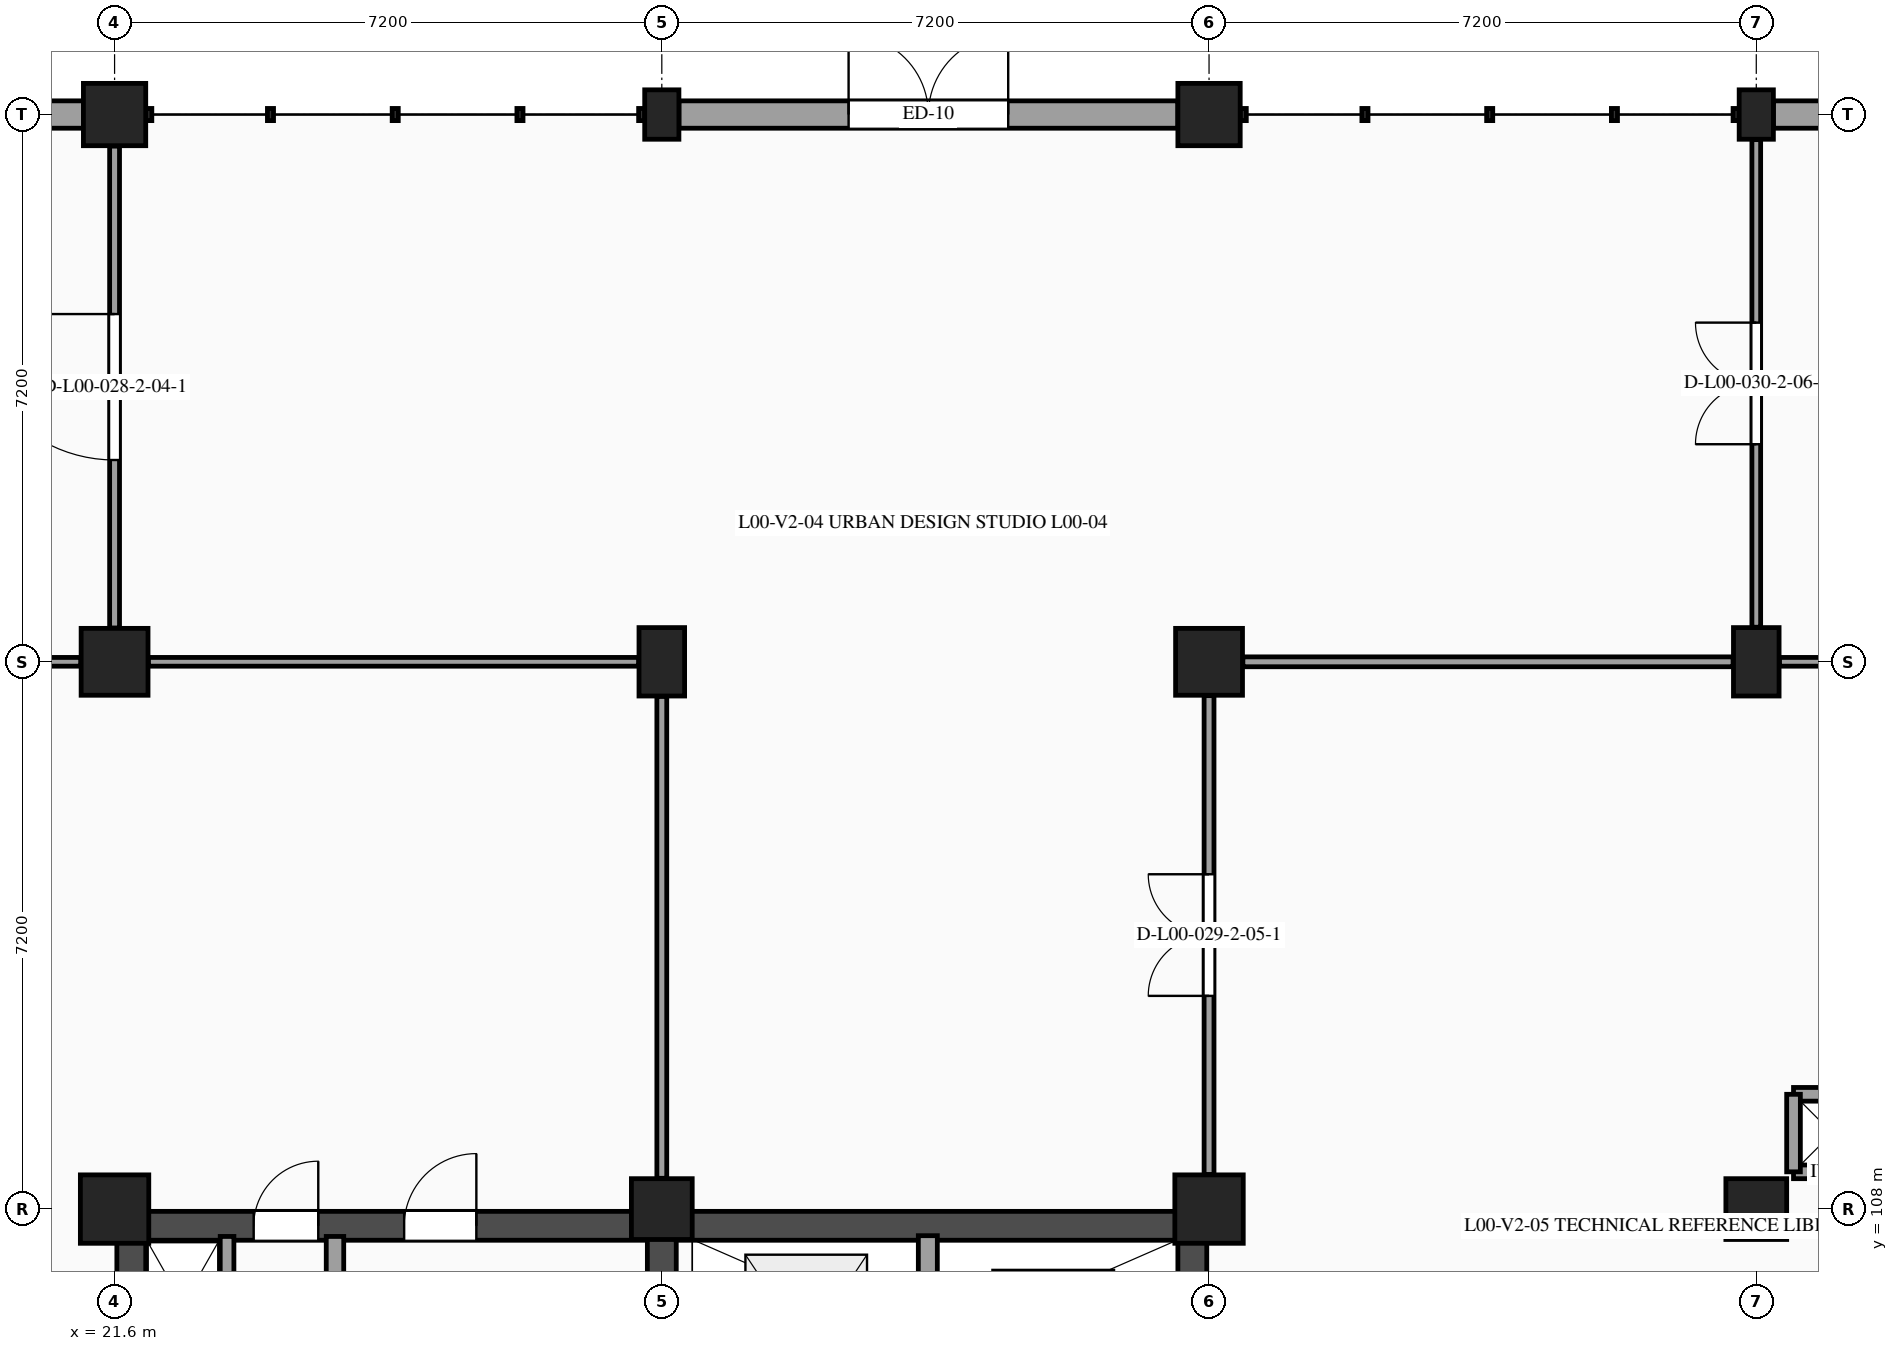
"""IFC4 building model, lengths in metres.
Left out: names, types, materials, properties, quantities, classifications, styles, units other than length and angle.
Written with IfcOpenShell. Run it as: python <this file> out.ifc"""

import sys

from ifc_helpers import new_model, si_unit, direction, frame, frame_2d, origin, origin_2d, place, context, subcontext, project, spatial, rectangle, extrude, element, fill, save


model = new_model("IFC4")
c1 = context("Model", 3, precision=1e-05, world=origin(), true_north=direction((0.0, 1.0)))
c2 = subcontext(c1, "Body", "Model", "MODEL_VIEW")
j1 = project(units=[si_unit("LENGTHUNIT", "METRE"), si_unit("PLANEANGLEUNIT", "RADIAN")], contexts=[c1])
p1 = place(None, origin())
s1 = spatial("IfcSite", under=j1, at=p1, CompositionType="ELEMENT")
p2 = place(p1, origin())
s2 = spatial("IfcBuilding", under=s1, at=p2, CompositionType="ELEMENT")
p3 = place(p2, origin())
s3 = spatial("IfcBuildingStorey", under=s2, at=p3, CompositionType="ELEMENT", Elevation=0.0)
p4 = place(p3, frame((21.6, 108.0, 0.0), z_axis=(0.0, 0.0, 1.0), x_axis=(1.0, 0.0, 0.0)))
e1 = element("IfcColumn", 1, at=p4, inside=s3, PredefinedType="COLUMN", context=c2, shape_type="SweptSolid", body=[
    extrude(rectangle(XDim=0.9, YDim=0.9, at=origin_2d()), origin(), (0.0, 0.0, 1.0), 5.4),
])
p5 = place(p3, frame((21.6, 115.2, 0.0), z_axis=(0.0, 0.0, 1.0), x_axis=(1.0, 0.0, 0.0)))
e2 = element("IfcColumn", 2, at=p5, inside=s3, PredefinedType="COLUMN", context=c2, shape_type="SweptSolid", body=[
    extrude(rectangle(XDim=0.88, YDim=0.88, at=origin_2d()), origin(), (0.0, 0.0, 1.0), 5.4),
])
p6 = place(p3, frame((21.6, 122.4, 0.0), z_axis=(0.0, 0.0, 1.0), x_axis=(1.0, 0.0, 0.0)))
e3 = element("IfcColumn", 3, at=p6, inside=s3, PredefinedType="COLUMN", context=c2, shape_type="SweptSolid", body=[
    extrude(rectangle(XDim=0.82, YDim=0.82, at=origin_2d()), origin(), (0.0, 0.0, 1.0), 5.4),
])
p7 = place(p3, frame((28.8, 108.0, 0.0), z_axis=(0.0, 0.0, 1.0), x_axis=(1.0, 0.0, 0.0)))
e4 = element("IfcColumn", 4, at=p7, inside=s3, PredefinedType="COLUMN", context=c2, shape_type="SweptSolid", body=[
    extrude(rectangle(XDim=0.8, YDim=0.8, at=origin_2d()), origin(), (0.0, 0.0, 1.0), 5.4),
])
p8 = place(p3, frame((28.8, 115.2, 0.0), z_axis=(0.0, 0.0, 1.0), x_axis=(1.0, 0.0, 0.0)))
e5 = element("IfcColumn", 5, at=p8, inside=s3, PredefinedType="COLUMN", context=c2, shape_type="SweptSolid", body=[
    extrude(rectangle(XDim=0.6, YDim=0.9, at=origin_2d()), origin(), (0.0, 0.0, 1.0), 5.4),
])
p9 = place(p3, frame((28.8, 122.4, 0.0), z_axis=(0.0, 0.0, 1.0), x_axis=(1.0, 0.0, 0.0)))
e6 = element("IfcColumn", 6, at=p9, inside=s3, PredefinedType="PILASTER", context=c2, shape_type="SweptSolid", body=[
    extrude(rectangle(XDim=0.45, YDim=0.65, at=origin_2d()), origin(), (0.0, 0.0, 1.0), 5.4),
])
p10 = place(p3, frame((36.0, 108.0, 0.0), z_axis=(0.0, 0.0, 1.0), x_axis=(1.0, 0.0, 0.0)))
e7 = element("IfcColumn", 7, at=p10, inside=s3, PredefinedType="COLUMN", context=c2, shape_type="SweptSolid", body=[
    extrude(rectangle(XDim=0.9, YDim=0.9, at=origin_2d()), origin(), (0.0, 0.0, 1.0), 5.4),
])
p11 = place(p3, frame((36.0, 115.2, 0.0), z_axis=(0.0, 0.0, 1.0), x_axis=(1.0, 0.0, 0.0)))
e8 = element("IfcColumn", 8, at=p11, inside=s3, PredefinedType="COLUMN", context=c2, shape_type="SweptSolid", body=[
    extrude(rectangle(XDim=0.88, YDim=0.88, at=origin_2d()), origin(), (0.0, 0.0, 1.0), 5.4),
])
p12 = place(p3, frame((36.0, 122.4, 0.0), z_axis=(0.0, 0.0, 1.0), x_axis=(1.0, 0.0, 0.0)))
e9 = element("IfcColumn", 9, at=p12, inside=s3, PredefinedType="COLUMN", context=c2, shape_type="SweptSolid", body=[
    extrude(rectangle(XDim=0.82, YDim=0.82, at=origin_2d()), origin(), (0.0, 0.0, 1.0), 5.4),
])
p13 = place(p3, frame((43.2, 108.0, 0.0), z_axis=(0.0, 0.0, 1.0), x_axis=(1.0, 0.0, 0.0)))
e10 = element("IfcColumn", 10, at=p13, inside=s3, PredefinedType="COLUMN", context=c2, shape_type="SweptSolid", body=[
    extrude(rectangle(XDim=0.8, YDim=0.8, at=origin_2d()), origin(), (0.0, 0.0, 1.0), 5.4),
])
p14 = place(p3, frame((43.2, 115.2, 0.0), z_axis=(0.0, 0.0, 1.0), x_axis=(1.0, 0.0, 0.0)))
e11 = element("IfcColumn", 11, at=p14, inside=s3, PredefinedType="COLUMN", context=c2, shape_type="SweptSolid", body=[
    extrude(rectangle(XDim=0.6, YDim=0.9, at=origin_2d()), origin(), (0.0, 0.0, 1.0), 5.4),
])
p15 = place(p3, frame((43.2, 122.4, 0.0), z_axis=(0.0, 0.0, 1.0), x_axis=(1.0, 0.0, 0.0)))
e12 = element("IfcColumn", 12, at=p15, inside=s3, PredefinedType="PILASTER", context=c2, shape_type="SweptSolid", body=[
    extrude(rectangle(XDim=0.45, YDim=0.65, at=origin_2d()), origin(), (0.0, 0.0, 1.0), 5.4),
])
p16 = place(p3, frame((14.625, 122.4, 0.0), z_axis=(0.0, 0.0, 1.0), x_axis=(1.0, 0.0, 0.0)))
e13 = element("IfcWall", 13, at=p16, inside=s3, PredefinedType="STANDARD", context=c2, shape_type="SweptSolid", body=[
    extrude(rectangle(XDim=6.565, YDim=0.36, at=frame_2d((3.282, 0.0))), origin(), (0.0, 0.0, 1.0), 4.37),
])
p17 = place(p16, frame((2.232, 0.0, 0.0)))
e14 = element("IfcOpeningElement", 14, at=p17, cuts=e13, PredefinedType="OPENING", context=c2, shape_type="SweptSolid", body=[
    extrude(rectangle(XDim=2.1, YDim=2.4, at=frame_2d((1.05, 1.2))), frame((0.0, 0.19, 0.0), z_axis=(0.0, -1.0, 0.0), x_axis=(1.0, 0.0, 0.0)), (0.0, 0.0, 1.0), 0.38),
])
p18 = place(p3, frame((29.025, 122.4, 0.0), z_axis=(0.0, 0.0, 1.0), x_axis=(1.0, 0.0, 0.0)))
e15 = element("IfcWall", 15, at=p18, inside=s3, PredefinedType="STANDARD", context=c2, shape_type="SweptSolid", body=[
    extrude(rectangle(XDim=6.565, YDim=0.36, at=frame_2d((3.283, 0.0))), origin(), (0.0, 0.0, 1.0), 4.37),
])
p19 = place(p18, frame((2.232, 0.0, 0.0)))
e16 = element("IfcOpeningElement", 16, at=p19, cuts=e15, PredefinedType="OPENING", context=c2, shape_type="SweptSolid", body=[
    extrude(rectangle(XDim=2.1, YDim=2.4, at=frame_2d((1.05, 1.2))), frame((0.0, 0.19, 0.0), z_axis=(0.0, -1.0, 0.0), x_axis=(1.0, 0.0, 0.0)), (0.0, 0.0, 1.0), 0.38),
])
p20 = place(p3, frame((43.425, 122.4, 0.0), z_axis=(0.0, 0.0, 1.0), x_axis=(1.0, 0.0, 0.0)))
e17 = element("IfcWall", 17, at=p20, inside=s3, PredefinedType="STANDARD", context=c2, shape_type="SweptSolid", body=[
    extrude(rectangle(XDim=6.565, YDim=0.36, at=frame_2d((3.282, 0.0))), origin(), (0.0, 0.0, 1.0), 4.37),
])
p21 = place(p20, frame((2.232, 0.0, 0.0)))
e18 = element("IfcOpeningElement", 18, at=p21, cuts=e17, PredefinedType="OPENING", context=c2, shape_type="SweptSolid", body=[
    extrude(rectangle(XDim=2.1, YDim=2.4, at=frame_2d((1.05, 1.2))), frame((0.0, 0.19, 0.0), z_axis=(0.0, -1.0, 0.0), x_axis=(1.0, 0.0, 0.0)), (0.0, 0.0, 1.0), 0.38),
])
p22 = place(p3, frame((21.82, 107.97, 0.0), z_axis=(0.0, 0.0, 1.0), x_axis=(0.0, -1.0, 0.0)))
e19 = element("IfcWall", 19, at=p22, inside=s3, PredefinedType="SHEAR", context=c2, shape_type="SweptSolid", body=[
    extrude(rectangle(XDim=7.14, YDim=0.38, at=frame_2d((3.57, 0.0))), origin(), (0.0, 0.0, 1.0), 5.09),
])
p23 = place(p3, frame((22.01, 107.78, 0.0), z_axis=(0.0, 0.0, 1.0), x_axis=(1.0, 0.0, 0.0)))
e20 = element("IfcWall", 20, at=p23, inside=s3, PredefinedType="SHEAR", context=c2, shape_type="SweptSolid", body=[
    extrude(rectangle(XDim=6.6, YDim=0.38, at=frame_2d((3.3, 0.0))), origin(), (0.0, 0.0, 1.0), 5.09),
])
p24 = place(p23, frame((1.42, 0.0, 0.0)))
e21 = element("IfcOpeningElement", 21, at=p24, cuts=e20, PredefinedType="OPENING", context=c2, shape_type="SweptSolid", body=[
    extrude(rectangle(XDim=0.85, YDim=2.1, at=frame_2d((0.425, 1.05))), frame((0.0, 0.2, 0.0), z_axis=(0.0, -1.0, 0.0), x_axis=(1.0, 0.0, 0.0)), (0.0, 0.0, 1.0), 0.4),
])
p25 = place(p23, frame((3.4, 0.0, 0.0)))
e22 = element("IfcOpeningElement", 22, at=p25, cuts=e20, PredefinedType="OPENING", context=c2, shape_type="SweptSolid", body=[
    extrude(rectangle(XDim=0.95, YDim=2.15, at=frame_2d((0.475, 1.075))), frame((0.0, 0.2, 0.0), z_axis=(0.0, -1.0, 0.0), x_axis=(1.0, 0.0, 0.0)), (0.0, 0.0, 1.0), 0.4),
])
p26 = place(p3, frame((24.5, 105.9, 0.0), z_axis=(0.0, 0.0, 1.0), x_axis=(0.0, 1.0, 0.0)))
e23 = element("IfcWall", 23, at=p26, inside=s3, PredefinedType="PARTITIONING", context=c2, shape_type="SweptSolid", body=[
    extrude(rectangle(XDim=1.74, YDim=0.23, at=frame_2d((0.87, 0.0))), origin(), (0.0, 0.0, 1.0), 5.09),
])
p27 = place(p3, frame((23.08, 105.88, 0.0), z_axis=(0.0, 0.0, 1.0), x_axis=(0.0, 1.0, 0.0)))
e24 = element("IfcWall", 24, at=p27, inside=s3, PredefinedType="PARTITIONING", context=c2, shape_type="SweptSolid", body=[
    extrude(rectangle(XDim=1.76, YDim=0.18, at=frame_2d((0.88, 0.0))), origin(), (0.0, 0.0, 1.0), 5.09),
])
p28 = place(p3, frame((28.8, 100.83, 0.0), z_axis=(0.0, 0.0, 1.0), x_axis=(0.0, 1.0, 0.0)))
e25 = element("IfcWall", 25, at=p28, inside=s3, PredefinedType="SHEAR", context=c2, shape_type="SweptSolid", body=[
    extrude(rectangle(XDim=7.14, YDim=0.38, at=frame_2d((3.57, 0.0))), origin(), (0.0, 0.0, 1.0), 5.09),
])
p29 = place(p28, frame((1.4, 0.0, 0.0)))
e26 = element("IfcOpeningElement", 26, at=p29, cuts=e25, PredefinedType="OPENING", context=c2, shape_type="SweptSolid", body=[
    extrude(rectangle(XDim=1.8, YDim=2.2, at=frame_2d((0.9, 1.1))), frame((0.0, 0.2, 0.0), z_axis=(0.0, -1.0, 0.0), x_axis=(1.0, 0.0, 0.0)), (0.0, 0.0, 1.0), 0.4),
])
p30 = place(p3, frame((35.78, 100.83, 0.0), z_axis=(0.0, 0.0, 1.0), x_axis=(0.0, 1.0, 0.0)))
e27 = element("IfcWall", 27, at=p30, inside=s3, PredefinedType="SHEAR", context=c2, shape_type="SweptSolid", body=[
    extrude(rectangle(XDim=7.14, YDim=0.38, at=frame_2d((3.57, 0.0))), origin(), (0.0, 0.0, 1.0), 5.09),
])
p31 = place(p3, frame((28.99, 107.78, 0.0), z_axis=(0.0, 0.0, 1.0), x_axis=(1.0, 0.0, 0.0)))
e28 = element("IfcWall", 28, at=p31, inside=s3, PredefinedType="SHEAR", context=c2, shape_type="SweptSolid", body=[
    extrude(rectangle(XDim=6.6, YDim=0.38, at=frame_2d((3.3, 0.0))), origin(), (0.0, 0.0, 1.0), 5.09),
])
p32 = place(p3, frame((32.3, 104.78, 0.0), z_axis=(0.0, 0.0, 1.0), x_axis=(0.0, 1.0, 0.0)))
e29 = element("IfcWall", 29, at=p32, inside=s3, PredefinedType="PARTITIONING", context=c2, shape_type="SweptSolid", body=[
    extrude(rectangle(XDim=2.87, YDim=0.25, at=frame_2d((1.435, 0.0))), origin(), (0.0, 0.0, 1.0), 5.09),
])
for number, where, z_axis, x_axis in (
    (30, (43.69, 108.49, 0.0), (0.0, 0.0, 1.0), (1.0, 0.0, 0.0)),
    (31, (44.71, 109.51, 0.0), (0.0, 0.0, 1.0), (-1.0, 0.0, 0.0)),
    (32, (43.69, 109.51, 0.0), (0.0, 0.0, 1.0), (0.0, -1.0, 0.0)),
):
    element("IfcWall", number, at=place(p3, frame(where, z_axis=z_axis, x_axis=x_axis)), inside=s3, PredefinedType="PARTITIONING", context=c2, shape_type="SweptSolid", body=[
        extrude(rectangle(XDim=1.02, YDim=0.18, at=frame_2d((0.51, 0.0))), origin(), (0.0, 0.0, 1.0), 5.09),
    ])
p33 = place(p3, frame((14.705, 115.2, 0.0), z_axis=(0.0, 0.0, 1.0), x_axis=(1.0, 0.0, 0.0)))
e33 = element("IfcWall", 33, at=p33, inside=s3, PredefinedType="PARTITIONING", context=c2, shape_type="SweptSolid", body=[
    extrude(rectangle(XDim=6.45, YDim=0.115, at=frame_2d((3.225, 0.0))), origin(), (0.0, 0.0, 1.0), 4.35),
])
p34 = place(p3, frame((21.6, 115.645, 0.0), z_axis=(0.0, 0.0, 1.0), x_axis=(0.0, 1.0, 0.0)))
e34 = element("IfcWall", 34, at=p34, inside=s3, PredefinedType="PARTITIONING", context=c2, shape_type="SweptSolid", body=[
    extrude(rectangle(XDim=6.34, YDim=0.13, at=frame_2d((3.17, 0.0))), origin(), (0.0, 0.0, 1.0), 4.405),
])
p35 = place(p34, frame((2.21, 0.0, 0.0)))
e35 = element("IfcOpeningElement", 35, at=p35, cuts=e34, PredefinedType="OPENING", context=c2, shape_type="SweptSolid", body=[
    extrude(rectangle(XDim=1.92, YDim=2.35, at=frame_2d((0.96, 1.175))), frame((0.0, 0.075, 0.0), z_axis=(0.0, -1.0, 0.0), x_axis=(1.0, 0.0, 0.0)), (0.0, 0.0, 1.0), 0.15),
])
p36 = place(p3, frame((28.8, 108.405, 0.0), z_axis=(0.0, 0.0, 1.0), x_axis=(0.0, 1.0, 0.0)))
e36 = element("IfcWall", 36, at=p36, inside=s3, PredefinedType="PARTITIONING", context=c2, shape_type="SweptSolid", body=[
    extrude(rectangle(XDim=6.34, YDim=0.13, at=frame_2d((3.17, 0.0))), origin(), (0.0, 0.0, 1.0), 4.405),
])
p37 = place(p3, frame((22.045, 115.2, 0.0), z_axis=(0.0, 0.0, 1.0), x_axis=(1.0, 0.0, 0.0)))
e37 = element("IfcWall", 37, at=p37, inside=s3, PredefinedType="PARTITIONING", context=c2, shape_type="SweptSolid", body=[
    extrude(rectangle(XDim=6.45, YDim=0.115, at=frame_2d((3.225, 0.0))), origin(), (0.0, 0.0, 1.0), 4.365),
])
p38 = place(p3, frame((36.0, 108.455, 0.0), z_axis=(0.0, 0.0, 1.0), x_axis=(0.0, 1.0, 0.0)))
e38 = element("IfcWall", 38, at=p38, inside=s3, PredefinedType="PARTITIONING", context=c2, shape_type="SweptSolid", body=[
    extrude(rectangle(XDim=6.3, YDim=0.13, at=frame_2d((3.15, 0.0))), origin(), (0.0, 0.0, 1.0), 4.405),
])
p39 = place(p38, frame((2.35, 0.0, 0.0)))
e39 = element("IfcOpeningElement", 39, at=p39, cuts=e38, PredefinedType="OPENING", context=c2, shape_type="SweptSolid", body=[
    extrude(rectangle(XDim=1.6, YDim=2.2, at=frame_2d((0.8, 1.1))), frame((0.0, 0.075, 0.0), z_axis=(0.0, -1.0, 0.0), x_axis=(1.0, 0.0, 0.0)), (0.0, 0.0, 1.0), 0.15),
])
p40 = place(p3, frame((36.445, 115.2, 0.0), z_axis=(0.0, 0.0, 1.0), x_axis=(1.0, 0.0, 0.0)))
e40 = element("IfcWall", 40, at=p40, inside=s3, PredefinedType="PARTITIONING", context=c2, shape_type="SweptSolid", body=[
    extrude(rectangle(XDim=6.45, YDim=0.13, at=frame_2d((3.225, 0.0))), origin(), (0.0, 0.0, 1.0), 4.39),
])
p41 = place(p3, frame((43.2, 115.655, 0.0), z_axis=(0.0, 0.0, 1.0), x_axis=(0.0, 1.0, 0.0)))
e41 = element("IfcWall", 41, at=p41, inside=s3, PredefinedType="PARTITIONING", context=c2, shape_type="SweptSolid", body=[
    extrude(rectangle(XDim=6.415, YDim=0.115, at=frame_2d((3.208, 0.0))), origin(), (0.0, 0.0, 1.0), 4.405),
])
p42 = place(p41, frame((2.407, 0.0, 0.0)))
e42 = element("IfcOpeningElement", 42, at=p42, cuts=e41, PredefinedType="OPENING", context=c2, shape_type="SweptSolid", body=[
    extrude(rectangle(XDim=1.6, YDim=2.2, at=frame_2d((0.8, 1.1))), frame((0.0, 0.067, 0.0), z_axis=(0.0, -1.0, 0.0), x_axis=(1.0, 0.0, 0.0)), (0.0, 0.0, 1.0), 0.135),
])
p43 = place(p3, frame((43.505, 115.2, 0.0), z_axis=(0.0, 0.0, 1.0), x_axis=(1.0, 0.0, 0.0)))
e43 = element("IfcWall", 43, at=p43, inside=s3, PredefinedType="PARTITIONING", context=c2, shape_type="SweptSolid", body=[
    extrude(rectangle(XDim=6.45, YDim=0.115, at=frame_2d((3.225, 0.0))), origin(), (0.0, 0.0, 1.0), 4.43),
])
p44 = place(p19, origin())
e44 = element("IfcDoor", 44, at=p44, inside=s3, OperationType="DOUBLE_DOOR_SINGLE_SWING", PredefinedType="DOOR", context=c2, shape_type="SweptSolid", body=[
    extrude(rectangle(XDim=2.1, YDim=2.4, at=frame_2d((1.05, 1.2))), frame((0.0, 0.025, 0.0), z_axis=(0.0, -1.0, 0.0), x_axis=(1.0, 0.0, 0.0)), (0.0, 0.0, 1.0), 0.05),
])
fill(e16, e44)
p45 = place(p24, origin())
e45 = element("IfcDoor", 45, at=p45, inside=s3, OperationType="SINGLE_SWING_RIGHT", PredefinedType="DOOR", context=c2, shape_type="SweptSolid", body=[
    extrude(rectangle(XDim=0.85, YDim=2.1, at=frame_2d((0.425, 1.05))), frame((0.0, 0.025, 0.0), z_axis=(0.0, -1.0, 0.0), x_axis=(1.0, 0.0, 0.0)), (0.0, 0.0, 1.0), 0.05),
])
fill(e21, e45)
p46 = place(p25, origin())
e46 = element("IfcDoor", 46, at=p46, inside=s3, OperationType="SINGLE_SWING_RIGHT", PredefinedType="DOOR", context=c2, shape_type="SweptSolid", body=[
    extrude(rectangle(XDim=0.95, YDim=2.15, at=frame_2d((0.475, 1.075))), frame((0.0, 0.025, 0.0), z_axis=(0.0, -1.0, 0.0), x_axis=(1.0, 0.0, 0.0)), (0.0, 0.0, 1.0), 0.05),
])
fill(e22, e46)
p47 = place(p35, origin())
e47 = element("IfcDoor", 47, at=p47, inside=s3, OperationType="SINGLE_SWING_RIGHT", PredefinedType="DOOR", context=c2, shape_type="SweptSolid", body=[
    extrude(rectangle(XDim=1.92, YDim=2.35, at=frame_2d((0.96, 1.175))), frame((0.0, 0.025, 0.0), z_axis=(0.0, -1.0, 0.0), x_axis=(1.0, 0.0, 0.0)), (0.0, 0.0, 1.0), 0.05),
])
fill(e35, e47)
p48 = place(p39, origin())
e48 = element("IfcDoor", 48, at=p48, inside=s3, OperationType="DOUBLE_DOOR_SINGLE_SWING", PredefinedType="DOOR", context=c2, shape_type="SweptSolid", body=[
    extrude(rectangle(XDim=1.6, YDim=2.2, at=frame_2d((0.8, 1.1))), frame((0.0, 0.025, 0.0), z_axis=(0.0, -1.0, 0.0), x_axis=(1.0, 0.0, 0.0)), (0.0, 0.0, 1.0), 0.05),
])
fill(e39, e48)
p49 = place(p42, origin())
e49 = element("IfcDoor", 49, at=p49, inside=s3, OperationType="DOUBLE_DOOR_SINGLE_SWING", PredefinedType="DOOR", context=c2, shape_type="SweptSolid", body=[
    extrude(rectangle(XDim=1.6, YDim=2.2, at=frame_2d((0.8, 1.1))), frame((0.0, 0.025, 0.0), z_axis=(0.0, -1.0, 0.0), x_axis=(1.0, 0.0, 0.0)), (0.0, 0.0, 1.0), 0.05),
])
fill(e42, e49)
save(model, sys.argv[1])
